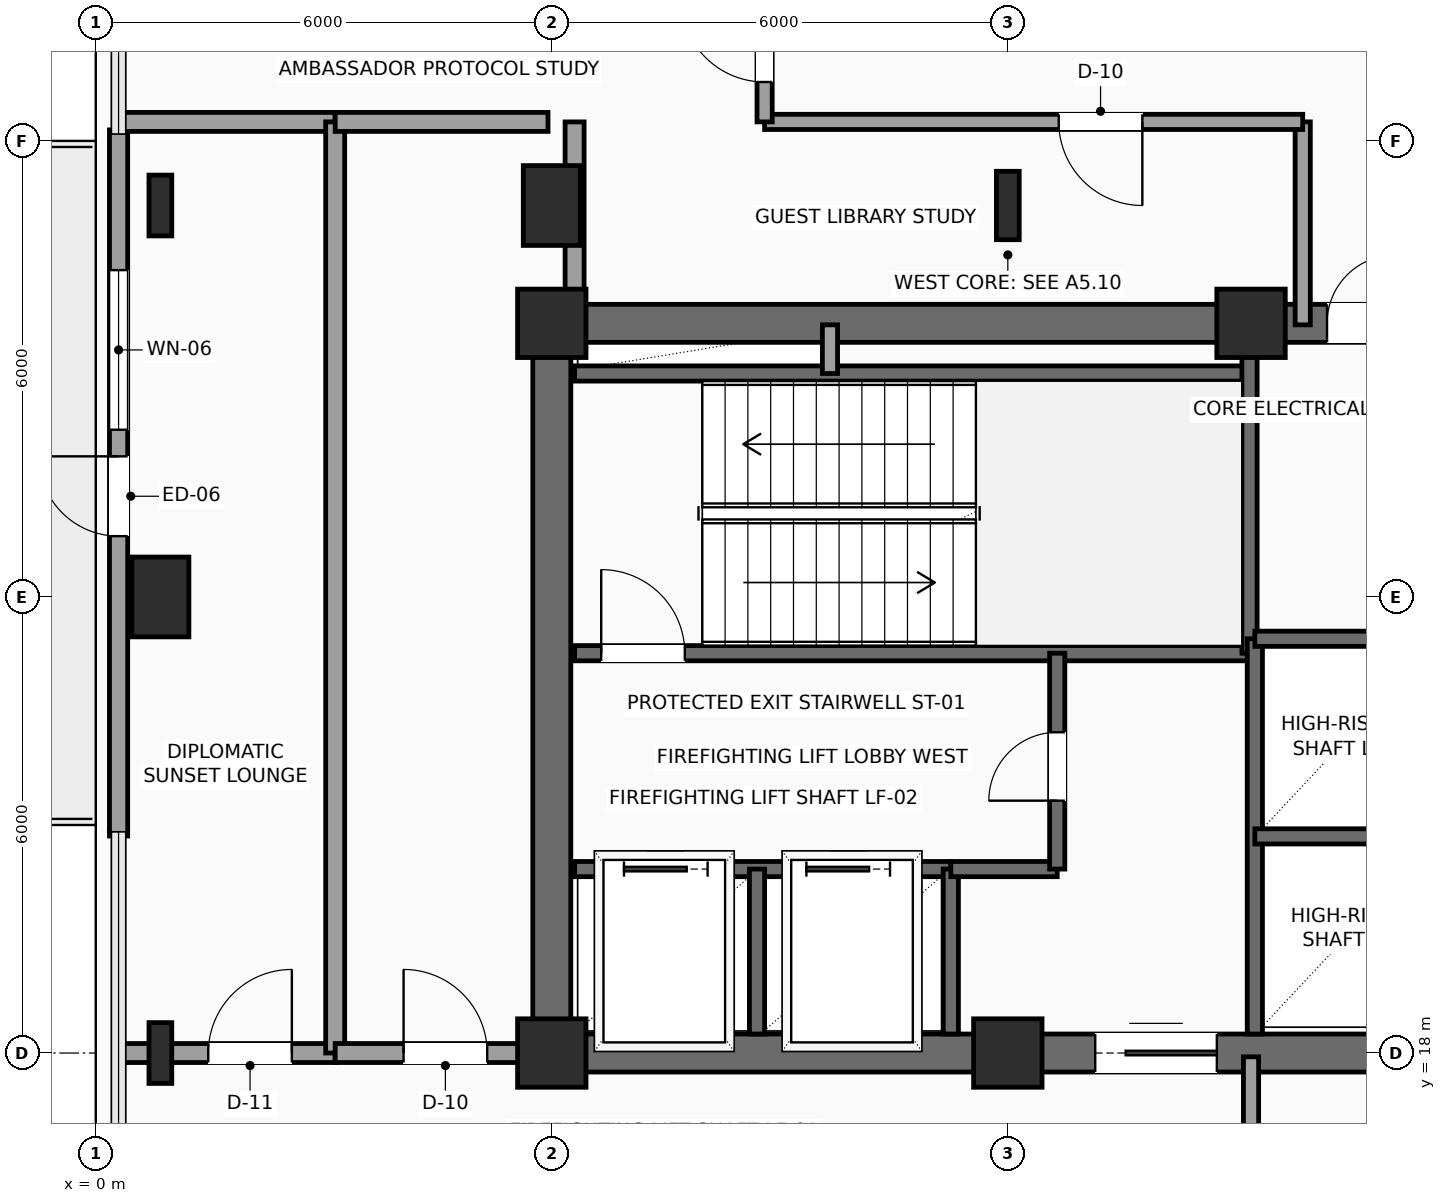
"""IFC4 building model, lengths in metres.
Left out: names, types, materials, properties, quantities, classifications, styles, units other than length and angle.
Written with IfcOpenShell. Run it as: python <this file> out.ifc"""

import sys

from ifc_helpers import new_model, si_unit, direction, frame, frame_2d, origin, origin_2d, place, context, subcontext, project, spatial, rectangle, i_section, extrude, element, fill, save


model = new_model("IFC4")
c1 = context("Model", 3, precision=1e-05, world=origin(), true_north=direction((0.0, 1.0)))
c2 = subcontext(c1, "Body", "Model", "MODEL_VIEW")
j1 = project(units=[si_unit("LENGTHUNIT", "METRE"), si_unit("PLANEANGLEUNIT", "RADIAN")], contexts=[c1])
p1 = place(None, origin())
s1 = spatial("IfcSite", under=j1, at=p1, CompositionType="ELEMENT")
p2 = place(p1, origin())
s2 = spatial("IfcBuilding", under=s1, at=p2, CompositionType="ELEMENT")
p3 = place(p2, frame((0.0, 0.0, 184.2)))
s3 = spatial("IfcBuildingStorey", under=s2, at=p3, CompositionType="ELEMENT", Elevation=184.2)
for number, where, z_axis, x_axis in (
    (1, (6.0, 18.0, 0.0), (0.0, 0.0, 1.0), (1.0, 0.0, 0.0)),
    (2, (12.0, 18.0, 0.0), (0.0, 0.0, 1.0), (1.0, 0.0, 0.0)),
    (3, (6.0, 27.6, 0.0), (0.0, 0.0, 1.0), (1.0, 0.0, 0.0)),
    (4, (15.2, 27.6, 0.0), (0.0, 0.0, 1.0), (1.0, 0.0, 0.0)),
):
    element("IfcColumn", number, at=place(p3, frame(where, z_axis=z_axis, x_axis=x_axis)), inside=s3, PredefinedType="COLUMN", context=c2, shape_type="SweptSolid", body=[
        extrude(rectangle(XDim=0.9, YDim=0.9, at=origin_2d()), origin(), (0.0, 0.0, 1.0), 3.75),
    ])
p4 = place(p3, frame((0.85, 18.0, 0.0), z_axis=(0.0, 0.0, 1.0), x_axis=(1.0, 0.0, 0.0)))
e5 = element("IfcColumn", 5, at=p4, inside=s3, PredefinedType="COLUMN", context=c2, shape_type="SweptSolid", body=[
    extrude(i_section(OverallWidth=0.3, OverallDepth=0.8, WebThickness=0.018, FlangeThickness=0.033, FilletRadius=0.03, at=origin_2d()), origin(), (0.0, 0.0, 1.0), 3.75),
])
p5 = place(p3, frame((0.85, 24.0, 0.0), z_axis=(0.0, 0.0, 1.0), x_axis=(1.0, 0.0, 0.0)))
e6 = element("IfcColumn", 6, at=p5, inside=s3, PredefinedType="COLUMN", context=c2, shape_type="SweptSolid", body=[
    extrude(rectangle(XDim=0.75, YDim=1.05, at=origin_2d()), origin(), (0.0, 0.0, 1.0), 3.75),
])
p6 = place(p3, frame((0.85, 29.15, 0.0), z_axis=(0.0, 0.0, 1.0), x_axis=(1.0, 0.0, 0.0)))
e7 = element("IfcColumn", 7, at=p6, inside=s3, PredefinedType="COLUMN", context=c2, shape_type="SweptSolid", body=[
    extrude(i_section(OverallWidth=0.3, OverallDepth=0.8, WebThickness=0.018, FlangeThickness=0.033, FilletRadius=0.03, at=origin_2d()), origin(), (0.0, 0.0, 1.0), 3.75),
])
p7 = place(p3, frame((6.0, 29.15, 0.0), z_axis=(0.0, 0.0, 1.0), x_axis=(1.0, 0.0, 0.0)))
e8 = element("IfcColumn", 8, at=p7, inside=s3, PredefinedType="COLUMN", context=c2, shape_type="SweptSolid", body=[
    extrude(rectangle(XDim=0.75, YDim=1.05, at=origin_2d()), origin(), (0.0, 0.0, 1.0), 3.75),
])
p8 = place(p3, frame((12.0, 29.15, 0.0), z_axis=(0.0, 0.0, 1.0), x_axis=(1.0, 0.0, 0.0)))
e9 = element("IfcColumn", 9, at=p8, inside=s3, PredefinedType="COLUMN", context=c2, shape_type="SweptSolid", body=[
    extrude(i_section(OverallWidth=0.3, OverallDepth=0.9, WebThickness=0.019, FlangeThickness=0.035, FilletRadius=0.03, at=origin_2d()), origin(), (0.0, 0.0, 1.0), 3.75),
])
p9 = place(p3, frame((0.3, 20.855, 0.0), z_axis=(0.0, 0.0, 1.0), x_axis=(0.0, 1.0, 0.0)))
e10 = element("IfcWall", 10, at=p9, inside=s3, PredefinedType="SOLIDWALL", context=c2, shape_type="SweptSolid", body=[
    extrude(rectangle(XDim=9.29, YDim=0.24, at=frame_2d((4.645, 0.0))), origin(), (0.0, 0.0, 1.0), 3.54),
])
p10 = place(p9, frame((3.945, 0.0, 0.0)))
e11 = element("IfcOpeningElement", 11, at=p10, cuts=e10, PredefinedType="OPENING", context=c2, shape_type="SweptSolid", body=[
    extrude(rectangle(XDim=1.05, YDim=2.2, at=frame_2d((0.525, 1.1))), frame((0.0, 0.13, 0.0), z_axis=(0.0, -1.0, 0.0), x_axis=(1.0, 0.0, 0.0)), (0.0, 0.0, 1.0), 0.26),
])
p11 = place(p9, frame((5.345, 0.0, 0.85)))
e12 = element("IfcOpeningElement", 12, at=p11, cuts=e10, PredefinedType="OPENING", context=c2, shape_type="SweptSolid", body=[
    extrude(rectangle(XDim=2.1, YDim=2.2, at=frame_2d((1.05, 1.1))), frame((0.0, 0.13, 0.0), z_axis=(0.0, -1.0, 0.0), x_axis=(1.0, 0.0, 0.0)), (0.0, 0.0, 1.0), 0.26),
])
p12 = place(p3, frame((6.0, 18.0, 0.0), z_axis=(0.0, 0.0, 1.0), x_axis=(1.0, 0.0, 0.0)))
e13 = element("IfcWall", 13, at=p12, inside=s3, PredefinedType="SHEAR", context=c2, shape_type="SweptSolid", body=[
    extrude(rectangle(XDim=12.0, YDim=0.5, at=frame_2d((6.0, 0.0))), origin(), (0.0, 0.0, 1.0), 3.54),
])
p13 = place(p12, frame((7.15, 0.0, 0.0)))
e14 = element("IfcOpeningElement", 14, at=p13, cuts=e13, PredefinedType="OPENING", context=c2, shape_type="SweptSolid", body=[
    extrude(rectangle(XDim=1.6, YDim=2.3, at=frame_2d((0.8, 1.15))), frame((0.0, 0.26, 0.0), z_axis=(0.0, -1.0, 0.0), x_axis=(1.0, 0.0, 0.0)), (0.0, 0.0, 1.0), 0.52),
])
p14 = place(p3, frame((6.0, 27.6, 0.0), z_axis=(0.0, 0.0, 1.0), x_axis=(1.0, 0.0, 0.0)))
e15 = element("IfcWall", 15, at=p14, inside=s3, PredefinedType="SHEAR", context=c2, shape_type="SweptSolid", body=[
    extrude(rectangle(XDim=12.0, YDim=0.5, at=frame_2d((6.0, 0.0))), origin(), (0.0, 0.0, 1.0), 3.54),
])
p15 = place(p14, frame((10.2, 0.0, 0.0)))
e16 = element("IfcOpeningElement", 16, at=p15, cuts=e15, PredefinedType="OPENING", context=c2, shape_type="SweptSolid", body=[
    extrude(rectangle(XDim=0.9, YDim=2.15, at=frame_2d((0.45, 1.075))), frame((0.0, 0.26, 0.0), z_axis=(0.0, -1.0, 0.0), x_axis=(1.0, 0.0, 0.0)), (0.0, 0.0, 1.0), 0.52),
])
p16 = place(p3, frame((6.0, 18.0, 0.0), z_axis=(0.0, 0.0, 1.0), x_axis=(0.0, 1.0, 0.0)))
e17 = element("IfcWall", 17, at=p16, inside=s3, PredefinedType="SHEAR", context=c2, shape_type="SweptSolid", body=[
    extrude(rectangle(XDim=9.6, YDim=0.5, at=frame_2d((4.8, 0.0))), origin(), (0.0, 0.0, 1.0), 3.54),
])
p17 = place(p3, frame((6.3, 23.26, 0.0), z_axis=(0.0, 0.0, 1.0), x_axis=(1.0, 0.0, 0.0)))
e18 = element("IfcWall", 18, at=p17, inside=s3, PredefinedType="SHEAR", context=c2, shape_type="SweptSolid", body=[
    extrude(rectangle(XDim=8.88, YDim=0.2, at=frame_2d((4.44, 0.0))), origin(), (0.0, 0.0, 1.0), 3.54),
])
p18 = place(p17, frame((0.35, 0.0, 0.0)))
e19 = element("IfcOpeningElement", 19, at=p18, cuts=e18, PredefinedType="OPENING", context=c2, shape_type="SweptSolid", body=[
    extrude(rectangle(XDim=1.1, YDim=2.2, at=frame_2d((0.55, 1.1))), frame((0.0, 0.11, 0.0), z_axis=(0.0, -1.0, 0.0), x_axis=(1.0, 0.0, 0.0)), (0.0, 0.0, 1.0), 0.22),
])
p19 = place(p3, frame((6.3, 26.94, 0.0), z_axis=(0.0, 0.0, 1.0), x_axis=(1.0, 0.0, 0.0)))
e20 = element("IfcWall", 20, at=p19, inside=s3, PredefinedType="SHEAR", context=c2, shape_type="SweptSolid", body=[
    extrude(rectangle(XDim=8.88, YDim=0.2, at=frame_2d((4.44, 0.0))), origin(), (0.0, 0.0, 1.0), 3.54),
])
p20 = place(p3, frame((15.18, 23.26, 0.0), z_axis=(0.0, 0.0, 1.0), x_axis=(0.0, 1.0, 0.0)))
e21 = element("IfcWall", 21, at=p20, inside=s3, PredefinedType="SHEAR", context=c2, shape_type="SweptSolid", body=[
    extrude(rectangle(XDim=4.04, YDim=0.2, at=frame_2d((2.02, 0.0))), origin(), (0.0, 0.0, 1.0), 3.54),
])
p21 = place(p3, frame((6.3, 20.42, 0.0), z_axis=(0.0, 0.0, 1.0), x_axis=(1.0, 0.0, 0.0)))
e22 = element("IfcWall", 22, at=p21, inside=s3, PredefinedType="SHEAR", context=c2, shape_type="SweptSolid", body=[
    extrude(rectangle(XDim=4.95, YDim=0.2, at=frame_2d((2.475, 0.0))), origin(), (0.0, 0.0, 1.0), 3.54),
])
p22 = place(p21, frame((0.65, 0.0, 0.0)))
e23 = element("IfcOpeningElement", 23, at=p22, cuts=e22, PredefinedType="OPENING", context=c2, shape_type="SweptSolid", body=[
    extrude(rectangle(XDim=1.1, YDim=2.2, at=frame_2d((0.55, 1.1))), frame((0.0, 0.11, 0.0), z_axis=(0.0, -1.0, 0.0), x_axis=(1.0, 0.0, 0.0)), (0.0, 0.0, 1.0), 0.22),
])
p23 = place(p21, frame((3.05, 0.0, 0.0)))
e24 = element("IfcOpeningElement", 24, at=p23, cuts=e22, PredefinedType="OPENING", context=c2, shape_type="SweptSolid", body=[
    extrude(rectangle(XDim=1.1, YDim=2.2, at=frame_2d((0.55, 1.1))), frame((0.0, 0.11, 0.0), z_axis=(0.0, -1.0, 0.0), x_axis=(1.0, 0.0, 0.0)), (0.0, 0.0, 1.0), 0.22),
])
for number, where, z_axis, x_axis in (
    (25, (8.7, 18.25, 0.0), (0.0, 0.0, 1.0), (0.0, 1.0, 0.0)),
    (26, (11.25, 18.25, 0.0), (0.0, 0.0, 1.0), (0.0, 1.0, 0.0)),
):
    element("IfcWall", number, at=place(p3, frame(where, z_axis=z_axis, x_axis=x_axis)), inside=s3, PredefinedType="SHEAR", context=c2, shape_type="SweptSolid", body=[
        extrude(rectangle(XDim=2.17, YDim=0.2, at=frame_2d((1.085, 0.0))), origin(), (0.0, 0.0, 1.0), 3.54),
    ])
p24 = place(p3, frame((11.25, 20.42, 0.0), z_axis=(0.0, 0.0, 1.0), x_axis=(1.0, 0.0, 0.0)))
e27 = element("IfcWall", 27, at=p24, inside=s3, PredefinedType="SHEAR", context=c2, shape_type="SweptSolid", body=[
    extrude(rectangle(XDim=1.4, YDim=0.2, at=frame_2d((0.7, 0.0))), origin(), (0.0, 0.0, 1.0), 3.54),
])
p25 = place(p3, frame((12.65, 20.42, 0.0), z_axis=(0.0, 0.0, 1.0), x_axis=(0.0, 1.0, 0.0)))
e28 = element("IfcWall", 28, at=p25, inside=s3, PredefinedType="SHEAR", context=c2, shape_type="SweptSolid", body=[
    extrude(rectangle(XDim=2.84, YDim=0.2, at=frame_2d((1.42, 0.0))), origin(), (0.0, 0.0, 1.0), 3.54),
])
p26 = place(p25, frame((0.9, 0.0, 0.0)))
e29 = element("IfcOpeningElement", 29, at=p26, cuts=e28, PredefinedType="OPENING", context=c2, shape_type="SweptSolid", body=[
    extrude(rectangle(XDim=0.9, YDim=2.15, at=frame_2d((0.45, 1.075))), frame((0.0, 0.11, 0.0), z_axis=(0.0, -1.0, 0.0), x_axis=(1.0, 0.0, 0.0)), (0.0, 0.0, 1.0), 0.22),
])
p27 = place(p3, frame((9.66, 26.94, 0.0), z_axis=(0.0, 0.0, 1.0), x_axis=(0.0, 1.0, 0.0)))
e30 = element("IfcWall", 30, at=p27, inside=s3, PredefinedType="SOLIDWALL", context=c2, shape_type="SweptSolid", body=[
    extrude(rectangle(XDim=0.64, YDim=0.2, at=frame_2d((0.32, 0.0))), origin(), (0.0, 0.0, 1.0), 3.54),
])
p28 = place(p3, frame((15.25, 18.25, 0.0), z_axis=(0.0, 0.0, 1.0), x_axis=(0.0, 1.0, 0.0)))
e31 = element("IfcWall", 31, at=p28, inside=s3, PredefinedType="SHEAR", context=c2, shape_type="SweptSolid", body=[
    extrude(rectangle(XDim=5.2, YDim=0.2, at=frame_2d((2.6, 0.0))), origin(), (0.0, 0.0, 1.0), 3.54),
])
p29 = place(p3, frame((15.25, 20.85, 0.0), z_axis=(0.0, 0.0, 1.0), x_axis=(1.0, 0.0, 0.0)))
e32 = element("IfcWall", 32, at=p29, inside=s3, PredefinedType="SHEAR", context=c2, shape_type="SweptSolid", body=[
    extrude(rectangle(XDim=2.4, YDim=0.2, at=frame_2d((1.2, 0.0))), origin(), (0.0, 0.0, 1.0), 3.54),
])
p30 = place(p3, frame((15.25, 23.45, 0.0), z_axis=(0.0, 0.0, 1.0), x_axis=(1.0, 0.0, 0.0)))
e33 = element("IfcWall", 33, at=p30, inside=s3, PredefinedType="SHEAR", context=c2, shape_type="SweptSolid", body=[
    extrude(rectangle(XDim=2.45, YDim=0.2, at=frame_2d((1.225, 0.0))), origin(), (0.0, 0.0, 1.0), 3.54),
])
p31 = place(p3, frame((15.2, 17.95, 0.0), z_axis=(0.0, 0.0, 1.0), x_axis=(0.0, -1.0, 0.0)))
e34 = element("IfcWall", 34, at=p31, inside=s3, PredefinedType="SOLIDWALL", context=c2, shape_type="SweptSolid", body=[
    extrude(rectangle(XDim=1.7, YDim=0.2, at=frame_2d((0.85, 0.0))), origin(), (0.0, 0.0, 1.0), 3.54),
])
p32 = place(p3, frame((15.88, 27.58, 0.0), z_axis=(0.0, 0.0, 1.0), x_axis=(0.0, 1.0, 0.0)))
e35 = element("IfcWall", 35, at=p32, inside=s3, PredefinedType="SOLIDWALL", context=c2, shape_type="SweptSolid", body=[
    extrude(rectangle(XDim=2.67, YDim=0.2, at=frame_2d((1.335, 0.0))), origin(), (0.0, 0.0, 1.0), 3.54),
])
p33 = place(p3, frame((15.88, 30.25, 0.0), z_axis=(0.0, 0.0, 1.0), x_axis=(-1.0, 0.0, 0.0)))
e36 = element("IfcWall", 36, at=p33, inside=s3, PredefinedType="SOLIDWALL", context=c2, shape_type="SweptSolid", body=[
    extrude(rectangle(XDim=7.08, YDim=0.2, at=frame_2d((3.54, 0.0))), origin(), (0.0, 0.0, 1.0), 3.54),
])
p34 = place(p33, frame((2.11, 0.0, 0.0)))
e37 = element("IfcOpeningElement", 37, at=p34, cuts=e36, PredefinedType="OPENING", context=c2, shape_type="SweptSolid", body=[
    extrude(rectangle(XDim=1.1, YDim=2.25, at=frame_2d((0.55, 1.125))), frame((0.0, 0.11, 0.0), z_axis=(0.0, -1.0, 0.0), x_axis=(1.0, 0.0, 0.0)), (0.0, 0.0, 1.0), 0.22),
])
p35 = place(p3, frame((8.8, 30.25, 0.0), z_axis=(0.0, 0.0, 1.0), x_axis=(0.0, 1.0, 0.0)))
e38 = element("IfcWall", 38, at=p35, inside=s3, PredefinedType="SOLIDWALL", context=c2, shape_type="SweptSolid", body=[
    extrude(rectangle(XDim=2.05, YDim=0.2, at=frame_2d((1.025, 0.0))), origin(), (0.0, 0.0, 1.0), 3.54),
])
p36 = place(p35, frame((0.525, 0.0, 0.0)))
e39 = element("IfcOpeningElement", 39, at=p36, cuts=e38, PredefinedType="OPENING", context=c2, shape_type="SweptSolid", body=[
    extrude(rectangle(XDim=1.1, YDim=2.25, at=frame_2d((0.55, 1.125))), frame((0.0, 0.11, 0.0), z_axis=(0.0, -1.0, 0.0), x_axis=(1.0, 0.0, 0.0)), (0.0, 0.0, 1.0), 0.22),
])
p37 = place(p3, frame((0.3, 18.0, 0.0), z_axis=(0.0, 0.0, 1.0), x_axis=(1.0, 0.0, 0.0)))
e40 = element("IfcWall", 40, at=p37, inside=s3, PredefinedType="PARTITIONING", context=c2, shape_type="SweptSolid", body=[
    extrude(rectangle(XDim=2.85, YDim=0.25, at=frame_2d((1.425, 0.0))), origin(), (0.0, 0.0, 1.0), 3.132),
])
p38 = place(p37, frame((1.18, 0.0, 0.0)))
e41 = element("IfcOpeningElement", 41, at=p38, cuts=e40, PredefinedType="OPENING", context=c2, shape_type="SweptSolid", body=[
    extrude(rectangle(XDim=1.1, YDim=2.25, at=frame_2d((0.55, 1.125))), frame((0.0, 0.135, 0.0), z_axis=(0.0, -1.0, 0.0), x_axis=(1.0, 0.0, 0.0)), (0.0, 0.0, 1.0), 0.27),
])
p39 = place(p3, frame((0.3, 30.25, 0.0), z_axis=(0.0, 0.0, 1.0), x_axis=(1.0, 0.0, 0.0)))
e42 = element("IfcWall", 42, at=p39, inside=s3, PredefinedType="PARTITIONING", context=c2, shape_type="SweptSolid", body=[
    extrude(rectangle(XDim=2.85, YDim=0.25, at=frame_2d((1.425, 0.0))), origin(), (0.0, 0.0, 1.0), 3.54),
])
p40 = place(p3, frame((3.15, 18.0, 0.0), z_axis=(0.0, 0.0, 1.0), x_axis=(0.0, 1.0, 0.0)))
e43 = element("IfcWall", 43, at=p40, inside=s3, PredefinedType="PARTITIONING", context=c2, shape_type="SweptSolid", body=[
    extrude(rectangle(XDim=12.25, YDim=0.25, at=frame_2d((6.125, 0.0))), origin(), (0.0, 0.0, 1.0), 3.54),
])
p41 = place(p3, frame((3.15, 18.0, 0.0), z_axis=(0.0, 0.0, 1.0), x_axis=(1.0, 0.0, 0.0)))
e44 = element("IfcWall", 44, at=p41, inside=s3, PredefinedType="PARTITIONING", context=c2, shape_type="SweptSolid", body=[
    extrude(rectangle(XDim=2.8, YDim=0.25, at=frame_2d((1.4, 0.0))), origin(), (0.0, 0.0, 1.0), 3.132),
])
p42 = place(p41, frame((0.9, 0.0, 0.0)))
e45 = element("IfcOpeningElement", 45, at=p42, cuts=e44, PredefinedType="OPENING", context=c2, shape_type="SweptSolid", body=[
    extrude(rectangle(XDim=1.1, YDim=2.25, at=frame_2d((0.55, 1.125))), frame((0.0, 0.135, 0.0), z_axis=(0.0, -1.0, 0.0), x_axis=(1.0, 0.0, 0.0)), (0.0, 0.0, 1.0), 0.27),
])
p43 = place(p3, frame((3.15, 30.25, 0.0), z_axis=(0.0, 0.0, 1.0), x_axis=(1.0, 0.0, 0.0)))
e46 = element("IfcWall", 46, at=p43, inside=s3, PredefinedType="PARTITIONING", context=c2, shape_type="SweptSolid", body=[
    extrude(rectangle(XDim=2.8, YDim=0.25, at=frame_2d((1.4, 0.0))), origin(), (0.0, 0.0, 1.0), 3.54),
])
p44 = place(p3, frame((6.3, 27.65, 0.0), z_axis=(0.0, 0.0, 1.0), x_axis=(0.0, 1.0, 0.0)))
e47 = element("IfcWall", 47, at=p44, inside=s3, PredefinedType="PARTITIONING", context=c2, shape_type="SweptSolid", body=[
    extrude(rectangle(XDim=2.6, YDim=0.25, at=frame_2d((1.3, 0.0))), origin(), (0.0, 0.0, 1.0), 3.132),
])
p45 = place(p10, origin())
e48 = element("IfcDoor", 48, at=p45, inside=s3, OperationType="SINGLE_SWING_RIGHT", PredefinedType="DOOR", context=c2, shape_type="SweptSolid", body=[
    extrude(rectangle(XDim=1.05, YDim=2.2, at=frame_2d((0.525, 1.1))), frame((0.0, 0.025, 0.0), z_axis=(0.0, -1.0, 0.0), x_axis=(1.0, 0.0, 0.0)), (0.0, 0.0, 1.0), 0.05),
])
fill(e11, e48)
p46 = place(p11, origin())
e49 = element("IfcWindow", 49, at=p46, inside=s3, PartitioningType="SINGLE_PANEL", PredefinedType="WINDOW", context=c2, shape_type="SweptSolid", body=[
    extrude(rectangle(XDim=2.1, YDim=2.2, at=frame_2d((1.05, 1.1))), frame((0.0, 0.03, 0.0), z_axis=(0.0, -1.0, 0.0), x_axis=(1.0, 0.0, 0.0)), (0.0, 0.0, 1.0), 0.06),
])
fill(e12, e49)
p47 = place(p13, origin())
e50 = element("IfcDoor", 50, at=p47, inside=s3, OperationType="DOUBLE_DOOR_SLIDING", PredefinedType="DOOR", context=c2, shape_type="SweptSolid", body=[
    extrude(rectangle(XDim=1.6, YDim=2.3, at=frame_2d((0.8, 1.15))), frame((0.0, 0.025, 0.0), z_axis=(0.0, -1.0, 0.0), x_axis=(1.0, 0.0, 0.0)), (0.0, 0.0, 1.0), 0.05),
])
fill(e14, e50)
p48 = place(p15, origin())
e51 = element("IfcDoor", 51, at=p48, inside=s3, OperationType="SINGLE_SWING_RIGHT", PredefinedType="DOOR", context=c2, shape_type="SweptSolid", body=[
    extrude(rectangle(XDim=0.9, YDim=2.15, at=frame_2d((0.45, 1.075))), frame((0.0, 0.025, 0.0), z_axis=(0.0, -1.0, 0.0), x_axis=(1.0, 0.0, 0.0)), (0.0, 0.0, 1.0), 0.05),
])
fill(e16, e51)
p49 = place(p18, origin())
e52 = element("IfcDoor", 52, at=p49, inside=s3, OperationType="SINGLE_SWING_LEFT", PredefinedType="DOOR", context=c2, shape_type="SweptSolid", body=[
    extrude(rectangle(XDim=1.1, YDim=2.2, at=frame_2d((0.55, 1.1))), frame((0.0, 0.025, 0.0), z_axis=(0.0, -1.0, 0.0), x_axis=(1.0, 0.0, 0.0)), (0.0, 0.0, 1.0), 0.05),
])
fill(e19, e52)
p50 = place(p22, origin())
e53 = element("IfcDoor", 53, at=p50, inside=s3, OperationType="SLIDING_TO_LEFT", PredefinedType="DOOR", context=c2, shape_type="SweptSolid", body=[
    extrude(rectangle(XDim=1.1, YDim=2.2, at=frame_2d((0.55, 1.1))), frame((0.0, 0.025, 0.0), z_axis=(0.0, -1.0, 0.0), x_axis=(1.0, 0.0, 0.0)), (0.0, 0.0, 1.0), 0.05),
])
fill(e23, e53)
p51 = place(p23, origin())
e54 = element("IfcDoor", 54, at=p51, inside=s3, OperationType="SLIDING_TO_LEFT", PredefinedType="DOOR", context=c2, shape_type="SweptSolid", body=[
    extrude(rectangle(XDim=1.1, YDim=2.2, at=frame_2d((0.55, 1.1))), frame((0.0, 0.025, 0.0), z_axis=(0.0, -1.0, 0.0), x_axis=(1.0, 0.0, 0.0)), (0.0, 0.0, 1.0), 0.05),
])
fill(e24, e54)
p52 = place(p26, origin())
e55 = element("IfcDoor", 55, at=p52, inside=s3, OperationType="SINGLE_SWING_LEFT", PredefinedType="DOOR", context=c2, shape_type="SweptSolid", body=[
    extrude(rectangle(XDim=0.9, YDim=2.15, at=frame_2d((0.45, 1.075))), frame((0.0, 0.025, 0.0), z_axis=(0.0, -1.0, 0.0), x_axis=(1.0, 0.0, 0.0)), (0.0, 0.0, 1.0), 0.05),
])
fill(e29, e55)
p53 = place(p34, origin())
e56 = element("IfcDoor", 56, at=p53, inside=s3, OperationType="SINGLE_SWING_LEFT", PredefinedType="DOOR", context=c2, shape_type="SweptSolid", body=[
    extrude(rectangle(XDim=1.1, YDim=2.25, at=frame_2d((0.55, 1.125))), frame((0.0, 0.025, 0.0), z_axis=(0.0, -1.0, 0.0), x_axis=(1.0, 0.0, 0.0)), (0.0, 0.0, 1.0), 0.05),
])
fill(e37, e56)
p54 = place(p36, origin())
e57 = element("IfcDoor", 57, at=p54, inside=s3, OperationType="SINGLE_SWING_RIGHT", PredefinedType="DOOR", context=c2, shape_type="SweptSolid", body=[
    extrude(rectangle(XDim=1.1, YDim=2.25, at=frame_2d((0.55, 1.125))), frame((0.0, 0.025, 0.0), z_axis=(0.0, -1.0, 0.0), x_axis=(1.0, 0.0, 0.0)), (0.0, 0.0, 1.0), 0.05),
])
fill(e39, e57)
p55 = place(p38, origin())
e58 = element("IfcDoor", 58, at=p55, inside=s3, OperationType="SINGLE_SWING_RIGHT", PredefinedType="DOOR", context=c2, shape_type="SweptSolid", body=[
    extrude(rectangle(XDim=1.1, YDim=2.25, at=frame_2d((0.55, 1.125))), frame((0.0, 0.025, 0.0), z_axis=(0.0, -1.0, 0.0), x_axis=(1.0, 0.0, 0.0)), (0.0, 0.0, 1.0), 0.05),
])
fill(e41, e58)
p56 = place(p42, origin())
e59 = element("IfcDoor", 59, at=p56, inside=s3, OperationType="SINGLE_SWING_LEFT", PredefinedType="DOOR", context=c2, shape_type="SweptSolid", body=[
    extrude(rectangle(XDim=1.1, YDim=2.25, at=frame_2d((0.55, 1.125))), frame((0.0, 0.025, 0.0), z_axis=(0.0, -1.0, 0.0), x_axis=(1.0, 0.0, 0.0)), (0.0, 0.0, 1.0), 0.05),
])
fill(e45, e59)
save(model, sys.argv[1])
